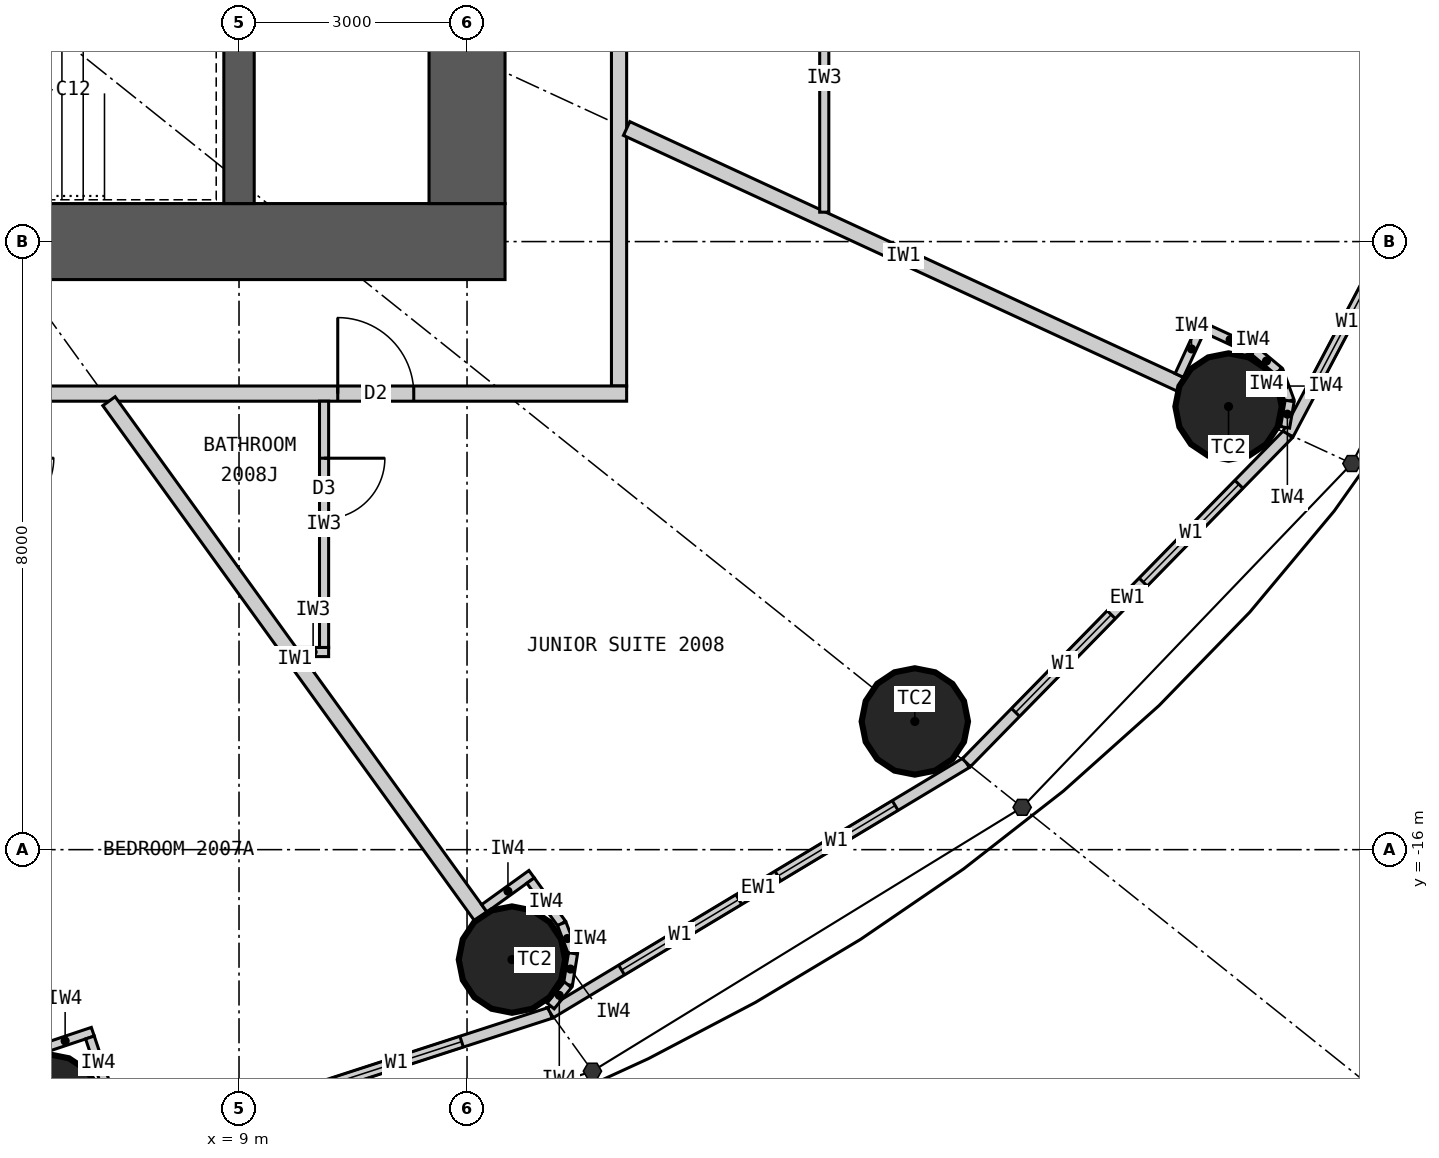
"""IFC4 building model, lengths in metres.
Left out: names, types, materials, properties, quantities, classifications, styles, units other than length and angle.
Written with IfcOpenShell. Run it as: python <this file> out.ifc"""

import sys

from ifc_helpers import new_model, si_unit, direction, frame, frame_2d, origin, origin_2d, place, context, subcontext, project, spatial, rectangle, circle, extrude, element, fill, save


model = new_model("IFC4")
c1 = context("Model", 3, precision=1e-05, world=origin(), true_north=direction((0.0, 1.0)))
c2 = subcontext(c1, "Body", "Model", "MODEL_VIEW")
j1 = project(units=[si_unit("LENGTHUNIT", "METRE"), si_unit("PLANEANGLEUNIT", "RADIAN")], contexts=[c1])
p1 = place(None, origin())
s1 = spatial("IfcSite", under=j1, at=p1, CompositionType="ELEMENT")
p2 = place(p1, origin())
s2 = spatial("IfcBuilding", under=s1, at=p2, CompositionType="ELEMENT")
p3 = place(p2, frame((0.0, 0.0, 80.4)))
s3 = spatial("IfcBuildingStorey", under=s2, at=p3, CompositionType="ELEMENT", Elevation=80.4)
for number, where, z_axis, x_axis in (
    (1, (6.495, -19.391, 0.0), (0.0, 0.0, 1.0), (1.0, 0.0, 0.0)),
    (2, (12.591, -17.447, 0.0), (0.0, 0.0, 1.0), (1.0, 0.0, 0.0)),
    (3, (17.892, -14.313, 0.0), (0.0, 0.0, 1.0), (1.0, 0.0, 0.0)),
    (4, (22.019, -10.17, 0.0), (0.0, 0.0, 1.0), (1.0, 0.0, 0.0)),
):
    element("IfcColumn", number, at=place(p3, frame(where, z_axis=z_axis, x_axis=x_axis)), inside=s3, PredefinedType="COLUMN", context=c2, shape_type="SweptSolid", body=[
        extrude(circle(Radius=0.7, at=origin_2d()), origin(), (0.0, 0.0, 1.0), 3.3),
    ])
p4 = place(p3, frame((12.5, -8.0, 0.0), z_axis=(0.0, 0.0, 1.0), x_axis=(-1.0, 0.0, 0.0)))
e5 = element("IfcWall", 5, at=p4, inside=s3, PredefinedType="SHEAR", context=c2, shape_type="SweptSolid", body=[
    extrude(rectangle(XDim=25.0, YDim=1.0, at=frame_2d((12.5, 0.0))), origin(), (0.0, 0.0, 1.0), 3.3),
])
p5 = place(p4, frame((11.2, 0.0, 0.0)))
e6 = element("IfcOpeningElement", 6, at=p5, cuts=e5, PredefinedType="OPENING", context=c2, shape_type="SweptSolid", body=[
    extrude(rectangle(XDim=1.2, YDim=2.2, at=frame_2d((0.6, 1.1))), frame((0.0, 0.51, 0.0), z_axis=(0.0, -1.0, 0.0), x_axis=(1.0, 0.0, 0.0)), (0.0, 0.0, 1.0), 1.02),
])
p6 = place(p4, frame((18.8, 0.0, 0.0)))
e7 = element("IfcOpeningElement", 7, at=p6, cuts=e5, PredefinedType="OPENING", context=c2, shape_type="SweptSolid", body=[
    extrude(rectangle(XDim=0.9, YDim=2.2, at=frame_2d((0.45, 1.1))), frame((0.0, 0.51, 0.0), z_axis=(0.0, -1.0, 0.0), x_axis=(1.0, 0.0, 0.0)), (0.0, 0.0, 1.0), 1.02),
])
p7 = place(p3, frame((12.0, -7.5, 0.0), z_axis=(0.0, 0.0, 1.0), x_axis=(0.0, 1.0, 0.0)))
e8 = element("IfcWall", 8, at=p7, inside=s3, PredefinedType="SHEAR", context=c2, shape_type="SweptSolid", body=[
    extrude(rectangle(XDim=15.0, YDim=1.0, at=frame_2d((7.5, 0.0))), origin(), (0.0, 0.0, 1.0), 3.3),
])
p8 = place(p7, frame((6.6, 0.0, 0.0)))
e9 = element("IfcOpeningElement", 9, at=p8, cuts=e8, PredefinedType="OPENING", context=c2, shape_type="SweptSolid", body=[
    extrude(rectangle(XDim=1.8, YDim=2.2, at=frame_2d((0.9, 1.1))), frame((0.0, 0.51, 0.0), z_axis=(0.0, -1.0, 0.0), x_axis=(1.0, 0.0, 0.0)), (0.0, 0.0, 1.0), 1.02),
])
p9 = place(p3, frame((9.0, -7.5, 0.0), z_axis=(0.0, 0.0, 1.0), x_axis=(0.0, 1.0, 0.0)))
e10 = element("IfcWall", 10, at=p9, inside=s3, PredefinedType="SHEAR", context=c2, shape_type="SweptSolid", body=[
    extrude(rectangle(XDim=3.0, YDim=0.4, at=frame_2d((1.5, 0.0))), origin(), (0.0, 0.0, 1.0), 3.3),
])
p10 = place(p3, frame((6.766, -20.202, 0.0), z_axis=(0.0, 0.0, 1.0), x_axis=(0.951137534625, 0.308767534285, 0.0)))
e11 = element("IfcWall", 11, at=p10, inside=s3, PredefinedType="ELEMENTEDWALL", context=c2, shape_type="SweptSolid", body=[
    extrude(rectangle(XDim=6.655, YDim=0.15, at=frame_2d((3.328, 0.0))), origin(), (0.0, 0.0, 1.0), 3.12),
])
p11 = place(p10, frame((1.228, 0.0, 0.9)))
e12 = element("IfcOpeningElement", 12, at=p11, cuts=e11, PredefinedType="OPENING", context=c2, shape_type="SweptSolid", body=[
    extrude(rectangle(XDim=1.8, YDim=1.9, at=frame_2d((0.9, 0.95))), frame((0.0, 0.085, 0.0), z_axis=(0.0, -1.0, 0.0), x_axis=(1.0, 0.0, 0.0)), (0.0, 0.0, 1.0), 0.17),
])
p12 = place(p10, frame((3.628, 0.0, 0.9)))
e13 = element("IfcOpeningElement", 13, at=p12, cuts=e11, PredefinedType="OPENING", context=c2, shape_type="SweptSolid", body=[
    extrude(rectangle(XDim=1.8, YDim=1.9, at=frame_2d((0.9, 0.95))), frame((0.0, 0.085, 0.0), z_axis=(0.0, -1.0, 0.0), x_axis=(1.0, 0.0, 0.0)), (0.0, 0.0, 1.0), 0.17),
])
p13 = place(p3, frame((13.096, -18.147, 0.0), z_axis=(0.0, 0.0, 1.0), x_axis=(0.856983180864, 0.515344377787, 0.0)))
e14 = element("IfcWall", 14, at=p13, inside=s3, PredefinedType="ELEMENTEDWALL", context=c2, shape_type="SweptSolid", body=[
    extrude(rectangle(XDim=6.386, YDim=0.15, at=frame_2d((3.193, 0.0))), origin(), (0.0, 0.0, 1.0), 3.12),
])
p14 = place(p13, frame((1.093, 0.0, 0.9)))
e15 = element("IfcOpeningElement", 15, at=p14, cuts=e14, PredefinedType="OPENING", context=c2, shape_type="SweptSolid", body=[
    extrude(rectangle(XDim=1.8, YDim=1.9, at=frame_2d((0.9, 0.95))), frame((0.0, 0.085, 0.0), z_axis=(0.0, -1.0, 0.0), x_axis=(1.0, 0.0, 0.0)), (0.0, 0.0, 1.0), 0.17),
])
p15 = place(p13, frame((3.493, 0.0, 0.9)))
e16 = element("IfcOpeningElement", 16, at=p15, cuts=e14, PredefinedType="OPENING", context=c2, shape_type="SweptSolid", body=[
    extrude(rectangle(XDim=1.8, YDim=1.9, at=frame_2d((0.9, 0.95))), frame((0.0, 0.085, 0.0), z_axis=(0.0, -1.0, 0.0), x_axis=(1.0, 0.0, 0.0)), (0.0, 0.0, 1.0), 0.17),
])
p16 = place(p3, frame((18.57, -14.856, 0.0), z_axis=(0.0, 0.0, 1.0), x_axis=(0.699602905915, 0.714531856557, 0.0)))
e17 = element("IfcWall", 17, at=p16, inside=s3, PredefinedType="ELEMENTEDWALL", context=c2, shape_type="SweptSolid", body=[
    extrude(rectangle(XDim=6.051, YDim=0.15, at=frame_2d((3.025, 0.0))), origin(), (0.0, 0.0, 1.0), 3.12),
])
p17 = place(p16, frame((0.926, 0.0, 0.9)))
e18 = element("IfcOpeningElement", 18, at=p17, cuts=e17, PredefinedType="OPENING", context=c2, shape_type="SweptSolid", body=[
    extrude(rectangle(XDim=1.8, YDim=1.9, at=frame_2d((0.9, 0.95))), frame((0.0, 0.085, 0.0), z_axis=(0.0, -1.0, 0.0), x_axis=(1.0, 0.0, 0.0)), (0.0, 0.0, 1.0), 0.17),
])
p18 = place(p16, frame((3.325, 0.0, 0.9)))
e19 = element("IfcOpeningElement", 19, at=p18, cuts=e17, PredefinedType="OPENING", context=c2, shape_type="SweptSolid", body=[
    extrude(rectangle(XDim=1.8, YDim=1.9, at=frame_2d((0.9, 0.95))), frame((0.0, 0.085, 0.0), z_axis=(0.0, -1.0, 0.0), x_axis=(1.0, 0.0, 0.0)), (0.0, 0.0, 1.0), 0.17),
])
p19 = place(p3, frame((22.803, -10.532, 0.0), z_axis=(0.0, 0.0, 1.0), x_axis=(0.467296867008, 0.884100468321, 0.0)))
e20 = element("IfcWall", 20, at=p19, inside=s3, PredefinedType="ELEMENTEDWALL", context=c2, shape_type="SweptSolid", body=[
    extrude(rectangle(XDim=5.734, YDim=0.15, at=frame_2d((2.867, 0.0))), origin(), (0.0, 0.0, 1.0), 3.12),
])
p20 = place(p19, frame((0.767, 0.0, 0.9)))
e21 = element("IfcOpeningElement", 21, at=p20, cuts=e20, PredefinedType="OPENING", context=c2, shape_type="SweptSolid", body=[
    extrude(rectangle(XDim=1.8, YDim=1.9, at=frame_2d((0.9, 0.95))), frame((0.0, 0.085, 0.0), z_axis=(0.0, -1.0, 0.0), x_axis=(1.0, 0.0, 0.0)), (0.0, 0.0, 1.0), 0.17),
])
p21 = place(p19, frame((3.167, 0.0, 0.9)))
e22 = element("IfcOpeningElement", 22, at=p21, cuts=e20, PredefinedType="OPENING", context=c2, shape_type="SweptSolid", body=[
    extrude(rectangle(XDim=1.8, YDim=1.9, at=frame_2d((0.9, 0.95))), frame((0.0, 0.085, 0.0), z_axis=(0.0, -1.0, 0.0), x_axis=(1.0, 0.0, 0.0)), (0.0, 0.0, 1.0), 0.17),
])
p22 = place(p3, frame((14.0, -9.9, 0.0), z_axis=(0.0, 0.0, 1.0), x_axis=(0.0, 1.0, 0.0)))
e23 = element("IfcWall", 23, at=p22, inside=s3, PredefinedType="PARTITIONING", context=c2, shape_type="SweptSolid", body=[
    extrude(rectangle(XDim=19.8, YDim=0.2, at=frame_2d((9.9, 0.0))), origin(), (0.0, 0.0, 1.0), 3.12),
])
p23 = place(p22, frame((5.948, 0.0, 0.0)))
e24 = element("IfcOpeningElement", 24, at=p23, cuts=e23, PredefinedType="OPENING", context=c2, shape_type="SweptSolid", body=[
    extrude(rectangle(XDim=1.0, YDim=2.2, at=frame_2d((0.5, 1.1))), frame((0.0, 0.11, 0.0), z_axis=(0.0, -1.0, 0.0), x_axis=(1.0, 0.0, 0.0)), (0.0, 0.0, 1.0), 0.22),
])
p24 = place(p22, frame((11.46, 0.0, 0.0)))
e25 = element("IfcOpeningElement", 25, at=p24, cuts=e23, PredefinedType="OPENING", context=c2, shape_type="SweptSolid", body=[
    extrude(rectangle(XDim=1.0, YDim=2.2, at=frame_2d((0.5, 1.1))), frame((0.0, 0.11, 0.0), z_axis=(0.0, -1.0, 0.0), x_axis=(1.0, 0.0, 0.0)), (0.0, 0.0, 1.0), 0.22),
])
p25 = place(p3, frame((14.1, -10.0, 0.0), z_axis=(0.0, 0.0, 1.0), x_axis=(-1.0, 0.0, 0.0)))
e26 = element("IfcWall", 26, at=p25, inside=s3, PredefinedType="PARTITIONING", context=c2, shape_type="SweptSolid", body=[
    extrude(rectangle(XDim=28.2, YDim=0.2, at=frame_2d((14.1, 0.0))), origin(), (0.0, 0.0, 1.0), 3.12),
])
p26 = place(p25, frame((23.865, 0.0, 0.0)))
e27 = element("IfcOpeningElement", 27, at=p26, cuts=e26, PredefinedType="OPENING", context=c2, shape_type="SweptSolid", body=[
    extrude(rectangle(XDim=1.0, YDim=2.2, at=frame_2d((0.5, 1.1))), frame((0.0, 0.11, 0.0), z_axis=(0.0, -1.0, 0.0), x_axis=(1.0, 0.0, 0.0)), (0.0, 0.0, 1.0), 0.22),
])
p27 = place(p25, frame((18.529, 0.0, 0.0)))
e28 = element("IfcOpeningElement", 28, at=p27, cuts=e26, PredefinedType="OPENING", context=c2, shape_type="SweptSolid", body=[
    extrude(rectangle(XDim=1.0, YDim=2.2, at=frame_2d((0.5, 1.1))), frame((0.0, 0.11, 0.0), z_axis=(0.0, -1.0, 0.0), x_axis=(1.0, 0.0, 0.0)), (0.0, 0.0, 1.0), 0.22),
])
p28 = place(p25, frame((14.923, 0.0, 0.0)))
e29 = element("IfcOpeningElement", 29, at=p28, cuts=e26, PredefinedType="OPENING", context=c2, shape_type="SweptSolid", body=[
    extrude(rectangle(XDim=1.0, YDim=2.2, at=frame_2d((0.5, 1.1))), frame((0.0, 0.11, 0.0), z_axis=(0.0, -1.0, 0.0), x_axis=(1.0, 0.0, 0.0)), (0.0, 0.0, 1.0), 0.22),
])
p29 = place(p25, frame((2.801, 0.0, 0.0)))
e30 = element("IfcOpeningElement", 30, at=p29, cuts=e26, PredefinedType="OPENING", context=c2, shape_type="SweptSolid", body=[
    extrude(rectangle(XDim=1.0, YDim=2.2, at=frame_2d((0.5, 1.1))), frame((0.0, 0.11, 0.0), z_axis=(0.0, -1.0, 0.0), x_axis=(1.0, 0.0, 0.0)), (0.0, 0.0, 1.0), 0.22),
])
p30 = place(p3, frame((7.289, -10.1, 0.0), z_axis=(0.0, 0.0, 1.0), x_axis=(0.585198353053, -0.810890182197, 0.0)))
e31 = element("IfcWall", 31, at=p30, inside=s3, PredefinedType="PARTITIONING", context=c2, shape_type="SweptSolid", body=[
    extrude(rectangle(XDim=8.36, YDim=0.2, at=frame_2d((4.18, 0.0))), origin(), (0.0, 0.0, 1.0), 2.32),
])
p31 = place(p3, frame((14.1, -6.512, 0.0), z_axis=(0.0, 0.0, 1.0), x_axis=(0.907832871056, -0.419332181247, 0.0)))
e32 = element("IfcWall", 32, at=p31, inside=s3, PredefinedType="PARTITIONING", context=c2, shape_type="SweptSolid", body=[
    extrude(rectangle(XDim=8.023, YDim=0.2, at=frame_2d((4.011, 0.0))), origin(), (0.0, 0.0, 1.0), 2.32),
])
p32 = place(p3, frame((9.771, -13.4, 0.0), z_axis=(0.0, 0.0, 1.0), x_axis=(1.0, 0.0, 0.0)))
e33 = element("IfcWall", 33, at=p32, inside=s3, PredefinedType="PARTITIONING", context=c2, shape_type="SweptSolid", body=[
    extrude(rectangle(XDim=0.408, YDim=0.12, at=frame_2d((0.204, 0.0))), origin(), (0.0, 0.0, 1.0), 3.12),
])
p33 = place(p3, frame((10.119, -10.1, 0.0), z_axis=(0.0, 0.0, 1.0), x_axis=(0.0, -1.0, 0.0)))
e34 = element("IfcWall", 34, at=p33, inside=s3, PredefinedType="PARTITIONING", context=c2, shape_type="SweptSolid", body=[
    extrude(rectangle(XDim=3.24, YDim=0.12, at=frame_2d((1.62, 0.0))), origin(), (0.0, 0.0, 1.0), 3.12),
])
p34 = place(p33, frame((0.75, 0.0, 0.0)))
e35 = element("IfcOpeningElement", 35, at=p34, cuts=e34, PredefinedType="OPENING", context=c2, shape_type="SweptSolid", body=[
    extrude(rectangle(XDim=0.8, YDim=2.1, at=frame_2d((0.4, 1.05))), frame((0.0, 0.07, 0.0), z_axis=(0.0, -1.0, 0.0), x_axis=(1.0, 0.0, 0.0)), (0.0, 0.0, 1.0), 0.14),
])
p35 = place(p3, frame((16.7, -7.613, 0.0), z_axis=(0.0, 0.0, 1.0), x_axis=(0.0, 1.0, 0.0)))
e36 = element("IfcWall", 36, at=p35, inside=s3, PredefinedType="PARTITIONING", context=c2, shape_type="SweptSolid", body=[
    extrude(rectangle(XDim=3.541, YDim=0.12, at=frame_2d((1.771, 0.0))), origin(), (0.0, 0.0, 1.0), 3.12),
])
p36 = place(p3, frame((6.348, -18.639, 0.0), z_axis=(0.0, 0.0, 1.0), x_axis=(0.948268951266, 0.317468102437, 0.0)))
e37 = element("IfcWall", 37, at=p36, inside=s3, PredefinedType="PARTITIONING", context=c2, shape_type="SweptSolid", body=[
    extrude(rectangle(XDim=0.768, YDim=0.12, at=frame_2d((0.384, 0.0))), origin(), (0.0, 0.0, 1.0), 3.12),
])
p37 = place(p3, frame((7.038, -18.471, 0.0), z_axis=(0.0, 0.0, 1.0), x_axis=(0.317378466199, -0.9482989556, 0.0)))
e38 = element("IfcWall", 38, at=p37, inside=s3, PredefinedType="PARTITIONING", context=c2, shape_type="SweptSolid", body=[
    extrude(rectangle(XDim=0.7, YDim=0.12, at=frame_2d((0.35, 0.0))), origin(), (0.0, 0.0, 1.0), 3.12),
])
p38 = place(p3, frame((12.227, -16.772, 0.0), z_axis=(0.0, 0.0, 1.0), x_axis=(0.810821798253, 0.585293098778, 0.0)))
e39 = element("IfcWall", 39, at=p38, inside=s3, PredefinedType="PARTITIONING", context=c2, shape_type="SweptSolid", body=[
    extrude(rectangle(XDim=0.768, YDim=0.12, at=frame_2d((0.384, 0.0))), origin(), (0.0, 0.0, 1.0), 3.12),
])
p39 = place(p3, frame((12.836, -16.406, 0.0), z_axis=(0.0, 0.0, 1.0), x_axis=(0.585223113993, -0.810872312296, 0.0)))
e40 = element("IfcWall", 40, at=p39, inside=s3, PredefinedType="PARTITIONING", context=c2, shape_type="SweptSolid", body=[
    extrude(rectangle(XDim=0.7, YDim=0.12, at=frame_2d((0.35, 0.0))), origin(), (0.0, 0.0, 1.0), 3.12),
])
p40 = place(p3, frame((13.246, -16.974, 0.0), z_axis=(0.0, 0.0, 1.0), x_axis=(0.355728122235, -0.934589483705, 0.0)))
e41 = element("IfcWall", 41, at=p40, inside=s3, PredefinedType="PARTITIONING", context=c2, shape_type="SweptSolid", body=[
    extrude(rectangle(XDim=0.418, YDim=0.12, at=frame_2d((0.209, 0.0))), origin(), (0.0, 0.0, 1.0), 3.12),
])
p41 = place(p3, frame((13.394, -17.365, 0.0), z_axis=(0.0, 0.0, 1.0), x_axis=(-0.159379276926, -0.987217425943, 0.0)))
e42 = element("IfcWall", 42, at=p41, inside=s3, PredefinedType="PARTITIONING", context=c2, shape_type="SweptSolid", body=[
    extrude(rectangle(XDim=0.418, YDim=0.12, at=frame_2d((0.209, 0.0))), origin(), (0.0, 0.0, 1.0), 3.12),
])
p42 = place(p3, frame((13.328, -17.777, 0.0), z_axis=(0.0, 0.0, 1.0), x_axis=(-0.632276783541, -0.774742582407, 0.0)))
e43 = element("IfcWall", 43, at=p42, inside=s3, PredefinedType="PARTITIONING", context=c2, shape_type="SweptSolid", body=[
    extrude(rectangle(XDim=0.36, YDim=0.12, at=frame_2d((0.18, 0.0))), origin(), (0.0, 0.0, 1.0), 3.12),
])
p43 = place(p3, frame((21.371, -9.761, 0.0), z_axis=(0.0, 0.0, 1.0), x_axis=(0.419259891039, 0.907866258744, 0.0)))
e44 = element("IfcWall", 44, at=p43, inside=s3, PredefinedType="PARTITIONING", context=c2, shape_type="SweptSolid", body=[
    extrude(rectangle(XDim=0.768, YDim=0.12, at=frame_2d((0.384, 0.0))), origin(), (0.0, 0.0, 1.0), 3.12),
])
p44 = place(p3, frame((21.722, -9.144, 0.0), z_axis=(0.0, 0.0, 1.0), x_axis=(0.907877701396, -0.419235112208, 0.0)))
e45 = element("IfcWall", 45, at=p44, inside=s3, PredefinedType="PARTITIONING", context=c2, shape_type="SweptSolid", body=[
    extrude(rectangle(XDim=0.7, YDim=0.12, at=frame_2d((0.35, 0.0))), origin(), (0.0, 0.0, 1.0), 3.12),
])
p45 = place(p3, frame((22.358, -9.437, 0.0), z_axis=(0.0, 0.0, 1.0), x_axis=(0.768412687942, -0.639954639806, 0.0)))
e46 = element("IfcWall", 46, at=p45, inside=s3, PredefinedType="PARTITIONING", context=c2, shape_type="SweptSolid", body=[
    extrude(rectangle(XDim=0.418, YDim=0.12, at=frame_2d((0.209, 0.0))), origin(), (0.0, 0.0, 1.0), 3.12),
])
p46 = place(p3, frame((22.679, -9.705, 0.0), z_axis=(0.0, 0.0, 1.0), x_axis=(0.345164001646, -0.938542386879, 0.0)))
e47 = element("IfcWall", 47, at=p46, inside=s3, PredefinedType="PARTITIONING", context=c2, shape_type="SweptSolid", body=[
    extrude(rectangle(XDim=0.418, YDim=0.12, at=frame_2d((0.209, 0.0))), origin(), (0.0, 0.0, 1.0), 3.12),
])
p47 = place(p3, frame((22.823, -10.097, 0.0), z_axis=(0.0, 0.0, 1.0), x_axis=(-0.169674995186, -0.985500074079, 0.0)))
e48 = element("IfcWall", 48, at=p47, inside=s3, PredefinedType="PARTITIONING", context=c2, shape_type="SweptSolid", body=[
    extrude(rectangle(XDim=0.353, YDim=0.12, at=frame_2d((0.176, 0.0))), origin(), (0.0, 0.0, 1.0), 3.12),
])
p48 = place(p12, origin())
e49 = element("IfcWindow", 49, at=p48, inside=s3, PartitioningType="SINGLE_PANEL", PredefinedType="WINDOW", context=c2, shape_type="SweptSolid", body=[
    extrude(rectangle(XDim=1.8, YDim=1.9, at=frame_2d((0.9, 0.95))), frame((0.0, 0.03, 0.0), z_axis=(0.0, -1.0, 0.0), x_axis=(1.0, 0.0, 0.0)), (0.0, 0.0, 1.0), 0.06),
])
fill(e13, e49)
p49 = place(p14, origin())
e50 = element("IfcWindow", 50, at=p49, inside=s3, PartitioningType="SINGLE_PANEL", PredefinedType="WINDOW", context=c2, shape_type="SweptSolid", body=[
    extrude(rectangle(XDim=1.8, YDim=1.9, at=frame_2d((0.9, 0.95))), frame((0.0, 0.03, 0.0), z_axis=(0.0, -1.0, 0.0), x_axis=(1.0, 0.0, 0.0)), (0.0, 0.0, 1.0), 0.06),
])
fill(e15, e50)
p50 = place(p15, origin())
e51 = element("IfcWindow", 51, at=p50, inside=s3, PartitioningType="SINGLE_PANEL", PredefinedType="WINDOW", context=c2, shape_type="SweptSolid", body=[
    extrude(rectangle(XDim=1.8, YDim=1.9, at=frame_2d((0.9, 0.95))), frame((0.0, 0.03, 0.0), z_axis=(0.0, -1.0, 0.0), x_axis=(1.0, 0.0, 0.0)), (0.0, 0.0, 1.0), 0.06),
])
fill(e16, e51)
p51 = place(p17, origin())
e52 = element("IfcWindow", 52, at=p51, inside=s3, PartitioningType="SINGLE_PANEL", PredefinedType="WINDOW", context=c2, shape_type="SweptSolid", body=[
    extrude(rectangle(XDim=1.8, YDim=1.9, at=frame_2d((0.9, 0.95))), frame((0.0, 0.03, 0.0), z_axis=(0.0, -1.0, 0.0), x_axis=(1.0, 0.0, 0.0)), (0.0, 0.0, 1.0), 0.06),
])
fill(e18, e52)
p52 = place(p18, origin())
e53 = element("IfcWindow", 53, at=p52, inside=s3, PartitioningType="SINGLE_PANEL", PredefinedType="WINDOW", context=c2, shape_type="SweptSolid", body=[
    extrude(rectangle(XDim=1.8, YDim=1.9, at=frame_2d((0.9, 0.95))), frame((0.0, 0.03, 0.0), z_axis=(0.0, -1.0, 0.0), x_axis=(1.0, 0.0, 0.0)), (0.0, 0.0, 1.0), 0.06),
])
fill(e19, e53)
p53 = place(p20, origin())
e54 = element("IfcWindow", 54, at=p53, inside=s3, PartitioningType="SINGLE_PANEL", PredefinedType="WINDOW", context=c2, shape_type="SweptSolid", body=[
    extrude(rectangle(XDim=1.8, YDim=1.9, at=frame_2d((0.9, 0.95))), frame((0.0, 0.03, 0.0), z_axis=(0.0, -1.0, 0.0), x_axis=(1.0, 0.0, 0.0)), (0.0, 0.0, 1.0), 0.06),
])
fill(e21, e54)
p54 = place(p34, origin())
e55 = element("IfcDoor", 55, at=p54, inside=s3, OperationType="SINGLE_SWING_LEFT", PredefinedType="DOOR", context=c2, shape_type="SweptSolid", body=[
    extrude(rectangle(XDim=0.8, YDim=2.1, at=frame_2d((0.4, 1.05))), frame((0.0, 0.025, 0.0), z_axis=(0.0, -1.0, 0.0), x_axis=(1.0, 0.0, 0.0)), (0.0, 0.0, 1.0), 0.05),
])
fill(e35, e55)
p55 = place(p29, origin())
e56 = element("IfcDoor", 56, at=p55, inside=s3, OperationType="SINGLE_SWING_RIGHT", PredefinedType="DOOR", context=c2, shape_type="SweptSolid", body=[
    extrude(rectangle(XDim=1.0, YDim=2.2, at=frame_2d((0.5, 1.1))), frame((0.0, 0.025, 0.0), z_axis=(0.0, -1.0, 0.0), x_axis=(1.0, 0.0, 0.0)), (0.0, 0.0, 1.0), 0.05),
])
fill(e30, e56)
save(model, sys.argv[1])
